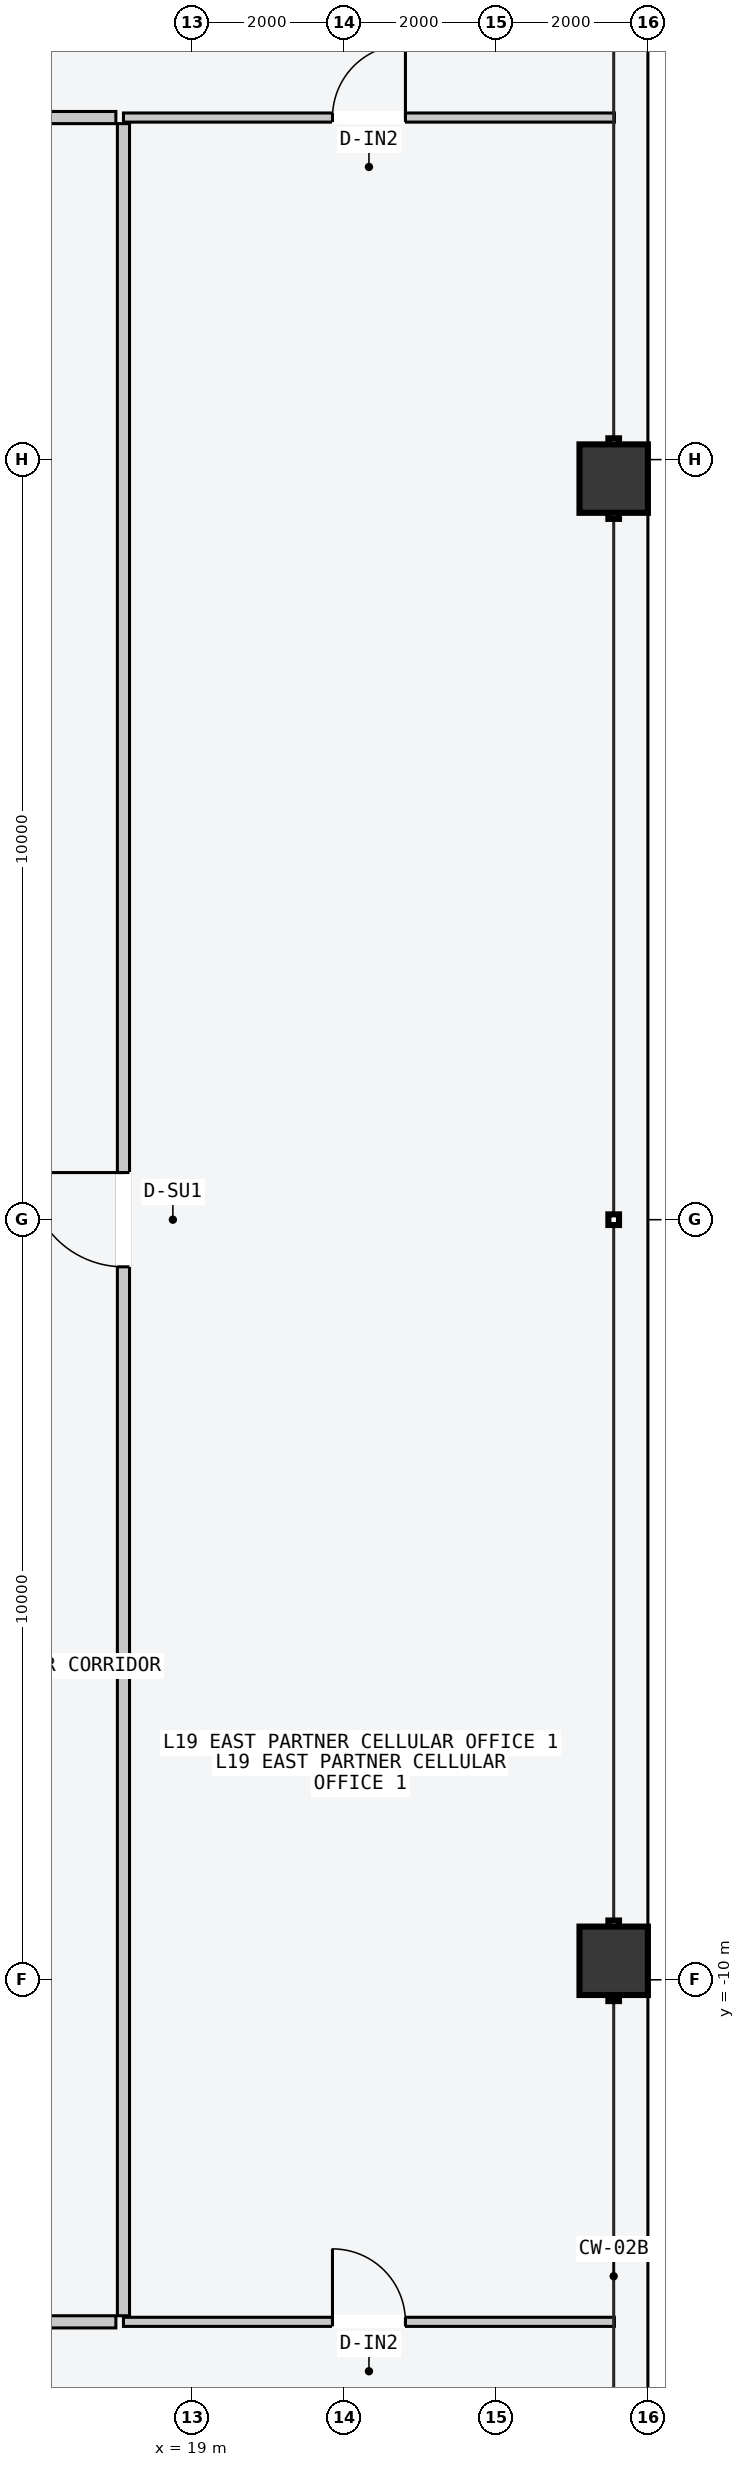
"""IFC4 building model, lengths in metres.
Left out: names, types, materials, properties, quantities, classifications, styles, units other than length and angle.
Written with IfcOpenShell. Run it as: python <this file> out.ifc"""

import sys

from ifc_helpers import new_model, si_unit, direction, frame, frame_2d, origin, origin_2d, place, context, subcontext, project, spatial, rectangle, hollow_rectangle, extrude, element, fill, save


model = new_model("IFC4")
c1 = context("Model", 3, precision=1e-05, world=origin(), true_north=direction((0.0, 1.0)))
c2 = subcontext(c1, "Body", "Model", "MODEL_VIEW")
j1 = project(units=[si_unit("LENGTHUNIT", "METRE"), si_unit("PLANEANGLEUNIT", "RADIAN")], contexts=[c1])
p1 = place(None, origin())
s1 = spatial("IfcSite", under=j1, at=p1, CompositionType="ELEMENT")
p2 = place(p1, origin())
s2 = spatial("IfcBuilding", under=s1, at=p2, CompositionType="ELEMENT")
p3 = place(p2, frame((0.0, 0.0, 74.4)))
s3 = spatial("IfcBuildingStorey", under=s2, at=p3, CompositionType="ELEMENT", Elevation=74.4)
for number, where, z_axis, x_axis in (
    (1, (24.55, -9.75, 0.0), (0.0, 0.0, 1.0), (0.0, 1.0, 0.0)),
    (2, (24.55, 9.75, 0.0), (0.0, 0.0, 1.0), (0.0, 1.0, 0.0)),
):
    element("IfcColumn", number, at=place(p3, frame(where, z_axis=z_axis, x_axis=x_axis)), inside=s3, PredefinedType="COLUMN", context=c2, shape_type="SweptSolid", body=[
        extrude(hollow_rectangle(XDim=0.9, YDim=0.9, WallThickness=0.045, at=origin_2d()), origin(), (0.0, 0.0, 1.0), 3.6),
    ])
p4 = place(p3, frame((-18.0, 14.5, 0.0), z_axis=(0.0, 0.0, 1.0), x_axis=(1.0, 0.0, 0.0)))
e3 = element("IfcWall", 3, at=p4, inside=s3, PredefinedType="PARTITIONING", context=c2, shape_type="SweptSolid", body=[
    extrude(rectangle(XDim=36.0, YDim=0.16, at=frame_2d((18.0, 0.0))), origin(), (0.0, 0.0, 1.0), 3.4),
])
p5 = place(p4, frame((4.09, 0.0, 0.0)))
e4 = element("IfcOpeningElement", 4, at=p5, cuts=e3, PredefinedType="OPENING", context=c2, shape_type="SweptSolid", body=[
    extrude(rectangle(XDim=1.06, YDim=2.2, at=frame_2d((0.53, 1.1))), frame((0.0, 0.09, 0.0), z_axis=(0.0, -1.0, 0.0), x_axis=(1.0, 0.0, 0.0)), (0.0, 0.0, 1.0), 0.18),
])
p6 = place(p4, frame((17.579, 0.0, 0.0)))
e5 = element("IfcOpeningElement", 5, at=p6, cuts=e3, PredefinedType="OPENING", context=c2, shape_type="SweptSolid", body=[
    extrude(rectangle(XDim=1.24, YDim=2.24, at=frame_2d((0.62, 1.12))), frame((0.0, 0.09, 0.0), z_axis=(0.0, -1.0, 0.0), x_axis=(1.0, 0.0, 0.0)), (0.0, 0.0, 1.0), 0.18),
])
p7 = place(p4, frame((30.879, 0.0, 0.0)))
e6 = element("IfcOpeningElement", 6, at=p7, cuts=e3, PredefinedType="OPENING", context=c2, shape_type="SweptSolid", body=[
    extrude(rectangle(XDim=1.4, YDim=2.2, at=frame_2d((0.7, 1.1))), frame((0.0, 0.09, 0.0), z_axis=(0.0, -1.0, 0.0), x_axis=(1.0, 0.0, 0.0)), (0.0, 0.0, 1.0), 0.18),
])
p8 = place(p3, frame((18.1, 14.5, 0.0), z_axis=(0.0, 0.0, 1.0), x_axis=(1.0, 0.0, 0.0)))
e7 = element("IfcWall", 7, at=p8, inside=s3, PredefinedType="PARTITIONING", context=c2, shape_type="SweptSolid", body=[
    extrude(rectangle(XDim=6.46, YDim=0.12, at=frame_2d((3.23, 0.0))), origin(), (0.0, 0.0, 1.0), 3.4),
])
p9 = place(p8, frame((2.75, 0.0, 0.0)))
e8 = element("IfcOpeningElement", 8, at=p9, cuts=e7, PredefinedType="OPENING", context=c2, shape_type="SweptSolid", body=[
    extrude(rectangle(XDim=0.96, YDim=2.18, at=frame_2d((0.48, 1.09))), frame((0.0, 0.07, 0.0), z_axis=(0.0, -1.0, 0.0), x_axis=(1.0, 0.0, 0.0)), (0.0, 0.0, 1.0), 0.14),
])
p10 = place(p3, frame((-18.0, -14.5, 0.0), z_axis=(0.0, 0.0, 1.0), x_axis=(1.0, 0.0, 0.0)))
e9 = element("IfcWall", 9, at=p10, inside=s3, PredefinedType="PARTITIONING", context=c2, shape_type="SweptSolid", body=[
    extrude(rectangle(XDim=36.0, YDim=0.16, at=frame_2d((18.0, 0.0))), origin(), (0.0, 0.0, 1.0), 3.4),
])
p11 = place(p10, frame((1.515, 0.0, 0.0)))
e10 = element("IfcOpeningElement", 10, at=p11, cuts=e9, PredefinedType="OPENING", context=c2, shape_type="SweptSolid", body=[
    extrude(rectangle(XDim=0.9, YDim=2.15, at=frame_2d((0.45, 1.075))), frame((0.0, 0.09, 0.0), z_axis=(0.0, -1.0, 0.0), x_axis=(1.0, 0.0, 0.0)), (0.0, 0.0, 1.0), 0.18),
])
p12 = place(p10, frame((7.299, 0.0, 0.0)))
e11 = element("IfcOpeningElement", 11, at=p12, cuts=e9, PredefinedType="OPENING", context=c2, shape_type="SweptSolid", body=[
    extrude(rectangle(XDim=0.96, YDim=2.18, at=frame_2d((0.48, 1.09))), frame((0.0, 0.09, 0.0), z_axis=(0.0, -1.0, 0.0), x_axis=(1.0, 0.0, 0.0)), (0.0, 0.0, 1.0), 0.18),
])
p13 = place(p10, frame((15.101, 0.0, 0.0)))
e12 = element("IfcOpeningElement", 12, at=p13, cuts=e9, PredefinedType="OPENING", context=c2, shape_type="SweptSolid", body=[
    extrude(rectangle(XDim=1.02, YDim=2.2, at=frame_2d((0.51, 1.1))), frame((0.0, 0.09, 0.0), z_axis=(0.0, -1.0, 0.0), x_axis=(1.0, 0.0, 0.0)), (0.0, 0.0, 1.0), 0.18),
])
p14 = place(p10, frame((23.443, 0.0, 0.0)))
e13 = element("IfcOpeningElement", 13, at=p14, cuts=e9, PredefinedType="OPENING", context=c2, shape_type="SweptSolid", body=[
    extrude(rectangle(XDim=1.06, YDim=2.2, at=frame_2d((0.53, 1.1))), frame((0.0, 0.09, 0.0), z_axis=(0.0, -1.0, 0.0), x_axis=(1.0, 0.0, 0.0)), (0.0, 0.0, 1.0), 0.18),
])
p15 = place(p10, frame((31.557, 0.0, 0.0)))
e14 = element("IfcOpeningElement", 14, at=p15, cuts=e9, PredefinedType="OPENING", context=c2, shape_type="SweptSolid", body=[
    extrude(rectangle(XDim=1.24, YDim=2.24, at=frame_2d((0.62, 1.12))), frame((0.0, 0.09, 0.0), z_axis=(0.0, -1.0, 0.0), x_axis=(1.0, 0.0, 0.0)), (0.0, 0.0, 1.0), 0.18),
])
p16 = place(p3, frame((18.1, -14.5, 0.0), z_axis=(0.0, 0.0, 1.0), x_axis=(1.0, 0.0, 0.0)))
e15 = element("IfcWall", 15, at=p16, inside=s3, PredefinedType="PARTITIONING", context=c2, shape_type="SweptSolid", body=[
    extrude(rectangle(XDim=6.46, YDim=0.12, at=frame_2d((3.23, 0.0))), origin(), (0.0, 0.0, 1.0), 3.4),
])
p17 = place(p16, frame((2.75, 0.0, 0.0)))
e16 = element("IfcOpeningElement", 16, at=p17, cuts=e15, PredefinedType="OPENING", context=c2, shape_type="SweptSolid", body=[
    extrude(rectangle(XDim=0.96, YDim=2.18, at=frame_2d((0.48, 1.09))), frame((0.0, 0.07, 0.0), z_axis=(0.0, -1.0, 0.0), x_axis=(1.0, 0.0, 0.0)), (0.0, 0.0, 1.0), 0.14),
])
p18 = place(p3, frame((18.1, -14.42, 0.0), z_axis=(0.0, 0.0, 1.0), x_axis=(0.0, 1.0, 0.0)))
e17 = element("IfcWall", 17, at=p18, inside=s3, PredefinedType="PARTITIONING", context=c2, shape_type="SweptSolid", body=[
    extrude(rectangle(XDim=28.84, YDim=0.16, at=frame_2d((14.42, 0.0))), origin(), (0.0, 0.0, 1.0), 3.4),
])
p19 = place(p18, frame((13.8, 0.0, 0.0)))
e18 = element("IfcOpeningElement", 18, at=p19, cuts=e17, PredefinedType="OPENING", context=c2, shape_type="SweptSolid", body=[
    extrude(rectangle(XDim=1.24, YDim=2.24, at=frame_2d((0.62, 1.12))), frame((0.0, 0.09, 0.0), z_axis=(0.0, -1.0, 0.0), x_axis=(1.0, 0.0, 0.0)), (0.0, 0.0, 1.0), 0.18),
])
p20 = place(p9, origin())
e19 = element("IfcDoor", 19, at=p20, inside=s3, OperationType="SINGLE_SWING_RIGHT", PredefinedType="DOOR", context=c2, shape_type="SweptSolid", body=[
    extrude(rectangle(XDim=0.96, YDim=2.18, at=frame_2d((0.48, 1.09))), frame((0.0, 0.025, 0.0), z_axis=(0.0, -1.0, 0.0), x_axis=(1.0, 0.0, 0.0)), (0.0, 0.0, 1.0), 0.05),
])
fill(e8, e19)
p21 = place(p17, origin())
e20 = element("IfcDoor", 20, at=p21, inside=s3, OperationType="SINGLE_SWING_LEFT", PredefinedType="DOOR", context=c2, shape_type="SweptSolid", body=[
    extrude(rectangle(XDim=0.96, YDim=2.18, at=frame_2d((0.48, 1.09))), frame((0.0, 0.025, 0.0), z_axis=(0.0, -1.0, 0.0), x_axis=(1.0, 0.0, 0.0)), (0.0, 0.0, 1.0), 0.05),
])
fill(e16, e20)
p22 = place(p19, origin())
e21 = element("IfcDoor", 21, at=p22, inside=s3, OperationType="SINGLE_SWING_RIGHT", PredefinedType="DOOR", context=c2, shape_type="SweptSolid", body=[
    extrude(rectangle(XDim=1.24, YDim=2.24, at=frame_2d((0.62, 1.12))), frame((0.0, 0.025, 0.0), z_axis=(0.0, -1.0, 0.0), x_axis=(1.0, 0.0, 0.0)), (0.0, 0.0, 1.0), 0.05),
])
fill(e18, e21)
save(model, sys.argv[1])
